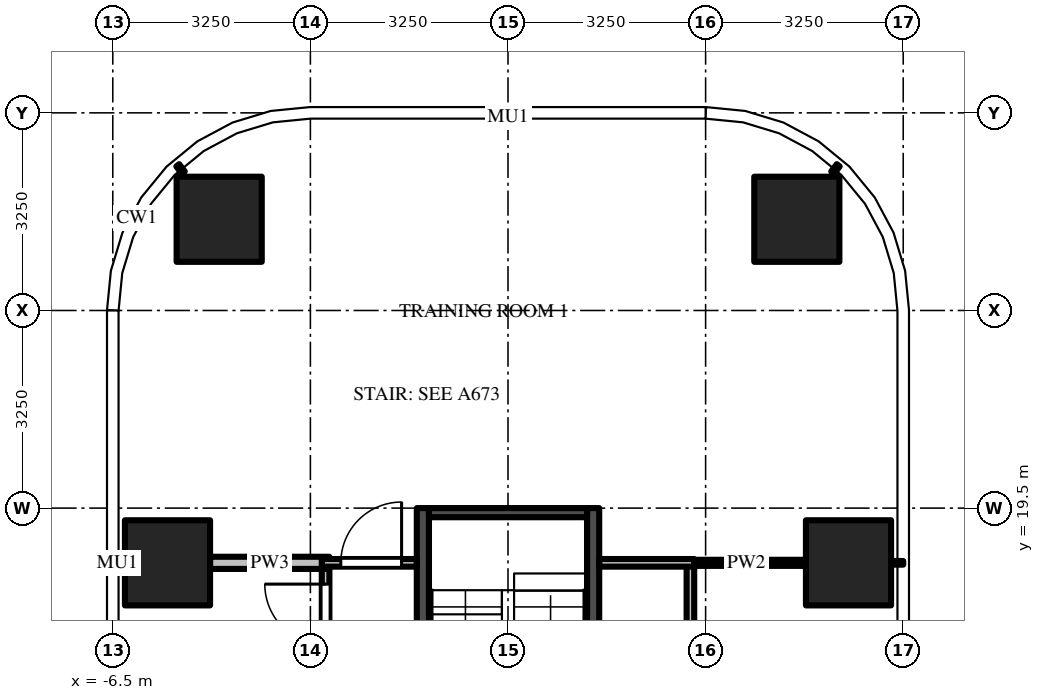
"""IFC4 building model, lengths in metres.
Left out: names, types, materials, properties, quantities, classifications, styles, units other than length and angle.
Written with IfcOpenShell. Run it as: python <this file> out.ifc"""

import sys

from ifc_helpers import new_model, si_unit, direction, frame, frame_2d, origin, origin_2d, place, context, subcontext, project, spatial, rectangle, extrude, source, transform, mapped, element, fill, save


model = new_model("IFC4")
c1 = context("Model", 3, precision=1e-05, world=origin(), true_north=direction((0.0, 1.0)))
c2 = subcontext(c1, "Body", "Model", "MODEL_VIEW")
j1 = project(units=[si_unit("LENGTHUNIT", "METRE"), si_unit("PLANEANGLEUNIT", "RADIAN")], contexts=[c1])
p1 = place(None, origin())
s1 = spatial("IfcSite", under=j1, at=p1, CompositionType="ELEMENT")
p2 = place(p1, origin())
s2 = spatial("IfcBuilding", under=s1, at=p2, CompositionType="ELEMENT")
p3 = place(p2, frame((0.0, 0.0, 65.5)))
s3 = spatial("IfcBuildingStorey", under=s2, at=p3, CompositionType="ELEMENT", Elevation=65.5)
m1 = source(origin(), c2, "Body", "SweptSolid", [
    extrude(rectangle(XDim=1.4, YDim=1.4, at=origin_2d()), origin(), (0.0, 0.0, 1.0), 4.5),
])
for number, where, z_axis, x_axis in (
    (1, (-5.6, 18.6, 0.0), (0.0, 0.0, 1.0), (1.0, 0.0, 0.0)),
    (2, (-4.75, 24.25, 0.0), (0.0, 0.0, 1.0), (1.0, 0.0, 0.0)),
    (3, (5.6, 18.6, 0.0), (0.0, 0.0, 1.0), (1.0, 0.0, 0.0)),
    (4, (4.75, 24.25, 0.0), (0.0, 0.0, 1.0), (1.0, 0.0, 0.0)),
):
    element("IfcColumn", number, at=place(p3, frame(where, z_axis=z_axis, x_axis=x_axis)), inside=s3, PredefinedType="COLUMN", context=c2, shape_type="MappedRepresentation", body=[
        mapped(m1, transform((0.0, 0.0, 0.0))),
    ])
m2 = source(origin(), c2, "Body", "SweptSolid", [
    extrude(rectangle(XDim=6.0, YDim=0.2, at=frame_2d((3.0, 0.0))), origin(), (0.0, 0.0, 1.0), 4.25),
])
for number, where, z_axis, x_axis in (
    (5, (-1.4, 13.5, 0.0), (0.0, 0.0, 1.0), (0.0, 1.0, 0.0)),
    (6, (1.4, 13.5, 0.0), (0.0, 0.0, 1.0), (0.0, 1.0, 0.0)),
):
    element("IfcWall", number, at=place(p3, frame(where, z_axis=z_axis, x_axis=x_axis)), inside=s3, PredefinedType="SHEAR", context=c2, shape_type="MappedRepresentation", body=[
        mapped(m2, transform((0.0, 0.0, 0.0))),
    ])
m3 = source(origin(), c2, "Body", "SweptSolid", [
    extrude(rectangle(XDim=2.6, YDim=0.15, at=frame_2d((1.3, 0.0))), origin(), (0.0, 0.0, 1.0), 4.25),
])
p4 = place(p3, frame((-1.3, 19.425, 0.0), z_axis=(0.0, 0.0, 1.0), x_axis=(1.0, 0.0, 0.0)))
e7 = element("IfcWall", 7, at=p4, inside=s3, PredefinedType="SHEAR", context=c2, shape_type="MappedRepresentation", body=[
    mapped(m3, transform((0.0, 0.0, 0.0))),
])
m4 = source(origin(), c2, "Body", "SweptSolid", [
    extrude(rectangle(XDim=6.3, YDim=0.125, at=frame_2d((3.15, 0.0))), origin(), (0.0, 0.0, 1.0), 3.468),
])
p5 = place(p3, frame((-3.0, 12.2, 0.0), z_axis=(0.0, 0.0, 1.0), x_axis=(0.0, 1.0, 0.0)))
e8 = element("IfcWall", 8, at=p5, inside=s3, PredefinedType="PARTITIONING", context=c2, shape_type="MappedRepresentation", body=[
    mapped(m4, transform((0.0, 0.0, 0.0))),
])
m5 = source(origin(), c2, "Body", "SweptSolid", [
    extrude(rectangle(XDim=1.0, YDim=2.1, at=frame_2d((0.5, 1.05))), frame((0.0, 0.073, 0.0), z_axis=(0.0, -1.0, 0.0), x_axis=(1.0, 0.0, 0.0)), (0.0, 0.0, 1.0), 0.145),
])
p6 = place(p5, frame((5.05, 0.0, 0.0)))
e9 = element("IfcOpeningElement", 9, at=p6, cuts=e8, PredefinedType="OPENING", context=c2, shape_type="MappedRepresentation", body=[
    mapped(m5, transform((0.0, 0.0, 0.0))),
])
m6 = source(origin(), c2, "Body", "SweptSolid", [
    extrude(rectangle(XDim=6.387, YDim=0.125, at=frame_2d((3.194, 0.0))), origin(), (0.0, 0.0, 1.0), 3.468),
])
p7 = place(p3, frame((3.0, 18.55, 0.0), z_axis=(0.0, 0.0, 1.0), x_axis=(0.0, -1.0, 0.0)))
e10 = element("IfcWall", 10, at=p7, inside=s3, PredefinedType="PARTITIONING", context=c2, shape_type="MappedRepresentation", body=[
    mapped(m6, transform((0.0, 0.0, 0.0))),
])
m7 = source(origin(), c2, "Body", "SweptSolid", [
    extrude(rectangle(XDim=1.962, YDim=0.2, at=frame_2d((0.981, 0.0))), origin(), (0.0, 0.0, 1.0), 3.697),
])
p8 = place(p3, frame((-4.9, 18.6, 0.0), z_axis=(0.0, 0.0, 1.0), x_axis=(1.0, 0.0, 0.0)))
e11 = element("IfcWall", 11, at=p8, inside=s3, PredefinedType="PARTITIONING", context=c2, shape_type="MappedRepresentation", body=[
    mapped(m7, transform((0.0, 0.0, 0.0))),
])
m8 = source(origin(), c2, "Body", "SweptSolid", [
    extrude(rectangle(XDim=1.962, YDim=0.1, at=frame_2d((0.981, 0.0))), origin(), (0.0, 0.0, 1.0), 3.697),
])
p9 = place(p3, frame((2.938, 18.6, 0.0), z_axis=(0.0, 0.0, 1.0), x_axis=(1.0, 0.0, 0.0)))
e12 = element("IfcWall", 12, at=p9, inside=s3, PredefinedType="PARTITIONING", context=c2, shape_type="MappedRepresentation", body=[
    mapped(m8, transform((0.0, 0.0, 0.0))),
])
m9 = source(origin(), c2, "Body", "SweptSolid", [
    extrude(rectangle(XDim=1.562, YDim=0.125, at=frame_2d((0.781, 0.0))), origin(), (0.0, 0.0, 1.0), 3.697),
])
p10 = place(p3, frame((-3.062, 18.6, 0.0), z_axis=(0.0, 0.0, 1.0), x_axis=(1.0, 0.0, 0.0)))
e13 = element("IfcWall", 13, at=p10, inside=s3, PredefinedType="PARTITIONING", context=c2, shape_type="MappedRepresentation", body=[
    mapped(m9, transform((0.0, 0.0, 0.0))),
])
p11 = place(p10, frame((0.312, 0.0, 0.0)))
e14 = element("IfcOpeningElement", 14, at=p11, cuts=e13, PredefinedType="OPENING", context=c2, shape_type="MappedRepresentation", body=[
    mapped(m5, transform((0.0, 0.0, 0.0))),
])
p12 = place(p3, frame((1.5, 18.6, 0.0), z_axis=(0.0, 0.0, 1.0), x_axis=(1.0, 0.0, 0.0)))
e15 = element("IfcWall", 15, at=p12, inside=s3, PredefinedType="PARTITIONING", context=c2, shape_type="MappedRepresentation", body=[
    mapped(m9, transform((0.0, 0.0, 0.0))),
])
m10 = source(origin(), c2, "Body", "SweptSolid", [
    extrude(rectangle(XDim=1.0, YDim=2.1, at=frame_2d((0.5, 1.05))), frame((0.0, 0.025, 0.0), z_axis=(0.0, -1.0, 0.0), x_axis=(1.0, 0.0, 0.0)), (0.0, 0.0, 1.0), 0.05),
])
p13 = place(p6, origin())
e16 = element("IfcDoor", 16, at=p13, inside=s3, OperationType="SINGLE_SWING_RIGHT", PredefinedType="DOOR", context=c2, shape_type="MappedRepresentation", body=[
    mapped(m10, transform((0.0, 0.0, 0.0))),
])
fill(e9, e16)
p14 = place(p11, origin())
e17 = element("IfcDoor", 17, at=p14, inside=s3, OperationType="SINGLE_SWING_RIGHT", PredefinedType="DOOR", context=c2, shape_type="MappedRepresentation", body=[
    mapped(m10, transform((0.0, 0.0, 0.0))),
])
fill(e14, e17)
save(model, sys.argv[1])
